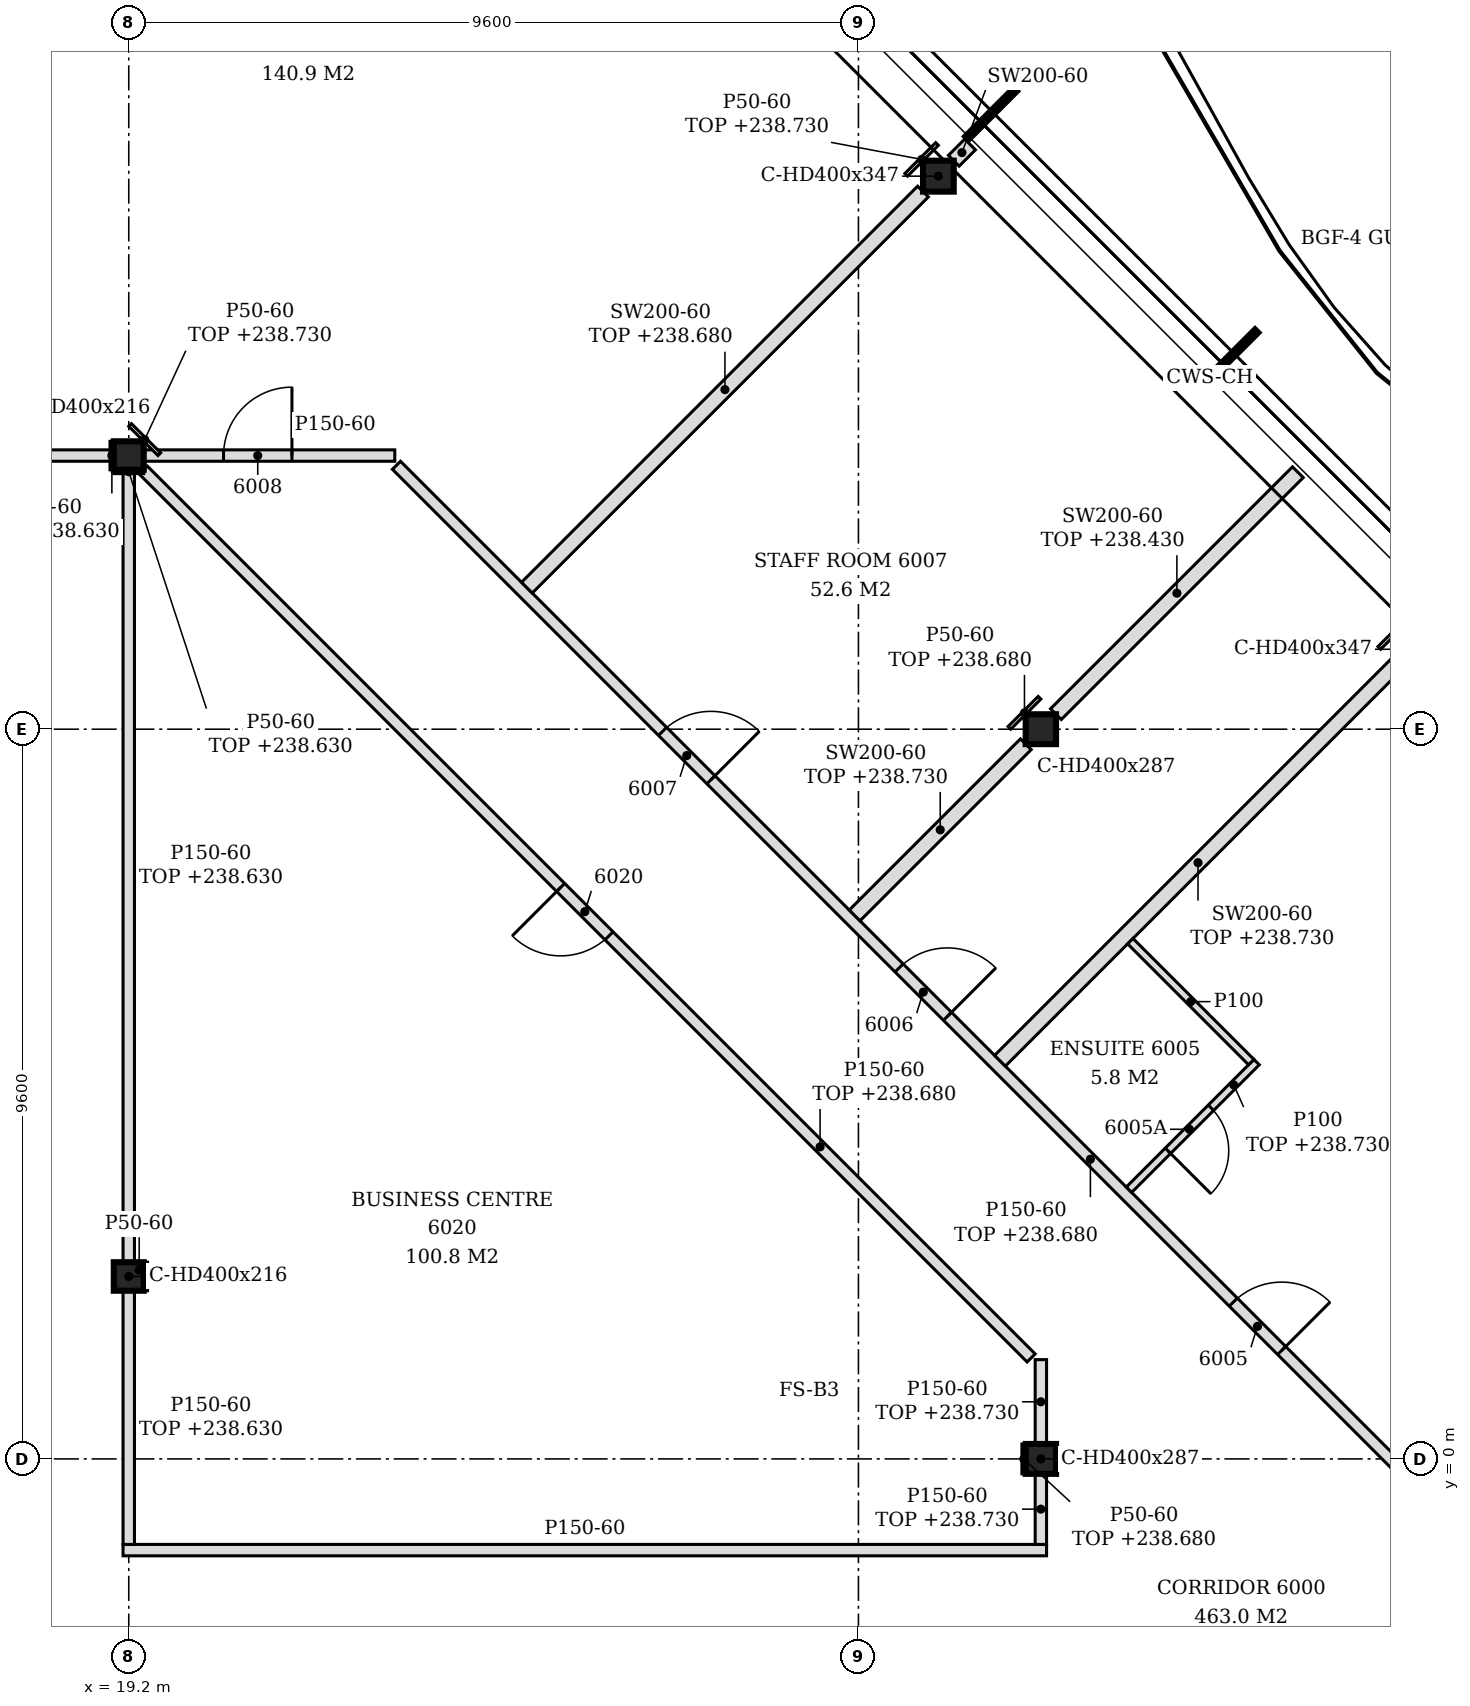
"""IFC4 building model, lengths in metres.
Left out: names, types, materials, properties, quantities, classifications, styles, units other than length and angle.
Written with IfcOpenShell. Run it as: python <this file> out.ifc"""

import sys

from ifc_helpers import new_model, si_unit, direction, frame, frame_2d, origin, origin_2d, place, context, subcontext, project, spatial, polyline, rectangle, i_section, outline, extrude, element, fill, save


model = new_model("IFC4")
c1 = context("Model", 3, precision=1e-05, world=origin(), true_north=direction((0.0, 1.0)))
c2 = subcontext(c1, "Body", "Model", "MODEL_VIEW")
j1 = project(units=[si_unit("LENGTHUNIT", "METRE"), si_unit("PLANEANGLEUNIT", "RADIAN")], contexts=[c1])
p1 = place(None, origin())
s1 = spatial("IfcSite", under=j1, at=p1, CompositionType="ELEMENT")
p2 = place(p1, origin())
s2 = spatial("IfcBuilding", under=s1, at=p2, CompositionType="ELEMENT")
p3 = place(p2, frame((0.0, 0.0, 235.8)))
s3 = spatial("IfcBuildingStorey", under=s2, at=p3, CompositionType="ELEMENT", Elevation=235.8)
p4 = place(p3, frame((29.852, 16.876, -0.15), z_axis=(0.0, 0.0, 1.0), x_axis=(1.0, 0.0, 0.0)))
e1 = element("IfcColumn", 1, at=p4, inside=s3, PredefinedType="COLUMN", context=c2, shape_type="SweptSolid", body=[
    extrude(i_section(OverallWidth=0.404, OverallDepth=0.407, WebThickness=0.027, FlangeThickness=0.044, FilletRadius=0.015, at=origin_2d()), origin(), (0.0, 0.0, 1.0), 3.6),
])
for number, where, z_axis, x_axis in (
    (2, (19.2, 2.4, -0.15), (0.0, 0.0, 1.0), (1.0, 0.0, 0.0)),
    (3, (19.2, 13.2, -0.15), (0.0, 0.0, 1.0), (1.0, 0.0, 0.0)),
):
    element("IfcColumn", number, at=place(p3, frame(where, z_axis=z_axis, x_axis=x_axis)), inside=s3, PredefinedType="COLUMN", context=c2, shape_type="SweptSolid", body=[
        extrude(i_section(OverallWidth=0.394, OverallDepth=0.375, WebThickness=0.017, FlangeThickness=0.028, FilletRadius=0.015, at=origin_2d()), origin(), (0.0, 0.0, 1.0), 3.6),
    ])
for number, where, z_axis, x_axis in (
    (4, (31.2, 0.0, -0.15), (0.0, 0.0, 1.0), (1.0, 0.0, 0.0)),
    (5, (31.2, 9.6, -0.15), (0.0, 0.0, 1.0), (1.0, 0.0, 0.0)),
):
    element("IfcColumn", number, at=place(p3, frame(where, z_axis=z_axis, x_axis=x_axis)), inside=s3, PredefinedType="COLUMN", context=c2, shape_type="SweptSolid", body=[
        extrude(i_section(OverallWidth=0.399, OverallDepth=0.393, WebThickness=0.023, FlangeThickness=0.037, FilletRadius=0.015, at=origin_2d()), origin(), (0.0, 0.0, 1.0), 3.6),
    ])
p5 = place(p3, frame((35.503, -4.012, 0.0), z_axis=(0.0, 0.0, 1.0), x_axis=(0.707106781187, 0.707106781187, 0.0)))
e6 = element("IfcWall", 6, at=p5, inside=s3, PredefinedType="PARTITIONING", context=c2, shape_type="SweptSolid", body=[
    extrude(rectangle(XDim=2.506, YDim=0.15, at=frame_2d((1.253, 0.0))), origin(), (0.0, 0.0, 1.0), 3.45),
])
p6 = place(p3, frame((37.072, -1.278, 0.0), z_axis=(0.0, 0.0, 1.0), x_axis=(-0.707106781187, 0.707106781187, 0.0)))
e7 = element("IfcWall", 7, at=p6, inside=s3, PredefinedType="PARTITIONING", context=c2, shape_type="SweptSolid", body=[
    extrude(rectangle(XDim=20.294, YDim=0.15, at=frame_2d((10.147, 0.0))), origin(), (0.0, 0.0, 1.0), 2.88),
])
p7 = place(p6, frame((3.824, 0.0, 0.0)))
e8 = element("IfcOpeningElement", 8, at=p7, cuts=e7, PredefinedType="OPENING", context=c2, shape_type="SweptSolid", body=[
    extrude(rectangle(XDim=0.9, YDim=2.1, at=frame_2d((0.45, 1.05))), frame((0.0, 0.085, 0.0), z_axis=(0.0, -1.0, 0.0), x_axis=(1.0, 0.0, 0.0)), (0.0, 0.0, 1.0), 0.17),
])
p8 = place(p6, frame((10.042, 0.0, 0.0)))
e9 = element("IfcOpeningElement", 9, at=p8, cuts=e7, PredefinedType="OPENING", context=c2, shape_type="SweptSolid", body=[
    extrude(rectangle(XDim=0.9, YDim=2.1, at=frame_2d((0.45, 1.05))), frame((0.0, 0.085, 0.0), z_axis=(0.0, -1.0, 0.0), x_axis=(1.0, 0.0, 0.0)), (0.0, 0.0, 1.0), 0.17),
])
p9 = place(p6, frame((14.443, 0.0, 0.0)))
e10 = element("IfcOpeningElement", 10, at=p9, cuts=e7, PredefinedType="OPENING", context=c2, shape_type="SweptSolid", body=[
    extrude(rectangle(XDim=0.9, YDim=2.1, at=frame_2d((0.45, 1.05))), frame((0.0, 0.085, 0.0), z_axis=(0.0, -1.0, 0.0), x_axis=(1.0, 0.0, 0.0)), (0.0, 0.0, 1.0), 0.17),
])
p10 = place(p3, frame((19.125, -1.2, 0.0), z_axis=(0.0, 0.0, 1.0), x_axis=(1.0, 0.0, 0.0)))
e11 = element("IfcWall", 11, at=p10, inside=s3, PredefinedType="PARTITIONING", context=c2, shape_type="SweptSolid", body=[
    extrude(outline(polyline([(0.0, 0.0), (12.15, 0.0), (12.15, 2.93), (11.925, 2.93), (11.923, 3.45), (0.225, 3.45), (0.223, 2.83), (0.0, 2.83), (0.0, 0.0)])), frame((0.0, 0.075, 0.0), z_axis=(0.0, -1.0, 0.0), x_axis=(1.0, 0.0, 0.0)), (0.0, 0.0, 1.0), 0.15),
])
p11 = place(p3, frame((19.2, -1.125, 0.0), z_axis=(0.0, 0.0, 1.0), x_axis=(0.0, 1.0, 0.0)))
e12 = element("IfcWall", 12, at=p11, inside=s3, PredefinedType="PARTITIONING", context=c2, shape_type="SweptSolid", body=[
    extrude(rectangle(XDim=3.337, YDim=0.15, at=frame_2d((1.669, 0.0))), origin(), (0.0, 0.0, 1.0), 2.83),
])
p12 = place(p3, frame((31.2, -1.125, 0.0), z_axis=(0.0, 0.0, 1.0), x_axis=(0.0, 1.0, 0.0)))
e13 = element("IfcWall", 13, at=p12, inside=s3, PredefinedType="PARTITIONING", context=c2, shape_type="SweptSolid", body=[
    extrude(rectangle(XDim=0.928, YDim=0.15, at=frame_2d((0.464, 0.0))), origin(), (0.0, 0.0, 1.0), 2.93),
])
p13 = place(p3, frame((31.2, 0.197, 0.0), z_axis=(0.0, 0.0, 1.0), x_axis=(0.0, 1.0, 0.0)))
e14 = element("IfcWall", 14, at=p13, inside=s3, PredefinedType="PARTITIONING", context=c2, shape_type="SweptSolid", body=[
    extrude(rectangle(XDim=1.11, YDim=0.15, at=frame_2d((0.555, 0.0))), origin(), (0.0, 0.0, 1.0), 2.93),
])
p14 = place(p3, frame((31.072, 1.328, 0.0), z_axis=(0.0, 0.0, 1.0), x_axis=(-0.707099390895, 0.707114171401, 0.0)))
e15 = element("IfcWall", 15, at=p14, inside=s3, PredefinedType="PARTITIONING", context=c2, shape_type="SweptSolid", body=[
    extrude(rectangle(XDim=16.518, YDim=0.15, at=frame_2d((8.259, 0.0))), origin(), (0.0, 0.0, 1.0), 2.88),
])
p15 = place(p14, frame((7.854, 0.0, 0.0)))
e16 = element("IfcOpeningElement", 16, at=p15, cuts=e15, PredefinedType="OPENING", context=c2, shape_type="SweptSolid", body=[
    extrude(rectangle(XDim=0.9, YDim=2.1, at=frame_2d((0.45, 1.05))), frame((0.0, 0.085, 0.0), z_axis=(0.0, -1.0, 0.0), x_axis=(1.0, 0.0, 0.0)), (0.0, 0.0, 1.0), 0.17),
])
p16 = place(p3, frame((19.2, 2.587, 0.0), z_axis=(0.0, 0.0, 1.0), x_axis=(0.0, 1.0, 0.0)))
e17 = element("IfcWall", 17, at=p16, inside=s3, PredefinedType="PARTITIONING", context=c2, shape_type="SweptSolid", body=[
    extrude(rectangle(XDim=10.425, YDim=0.15, at=frame_2d((5.212, 0.0))), origin(), (0.0, 0.0, 1.0), 2.83),
])
p17 = place(p3, frame((32.359, 3.541, 0.0), z_axis=(0.0, 0.0, 1.0), x_axis=(0.707158179099, 0.707055379538, 0.0)))
e18 = element("IfcWall", 18, at=p17, inside=s3, PredefinedType="PARTITIONING", context=c2, shape_type="SweptSolid", body=[
    extrude(rectangle(XDim=2.375, YDim=0.1, at=frame_2d((1.188, 0.0))), origin(), (0.0, 0.0, 1.0), 2.93),
])
p18 = place(p17, frame((0.725, 0.0, 0.0)))
e19 = element("IfcOpeningElement", 19, at=p18, cuts=e18, PredefinedType="OPENING", context=c2, shape_type="SweptSolid", body=[
    extrude(rectangle(XDim=0.8, YDim=2.1, at=frame_2d((0.4, 1.05))), frame((0.0, 0.06, 0.0), z_axis=(0.0, -1.0, 0.0), x_axis=(1.0, 0.0, 0.0)), (0.0, 0.0, 1.0), 0.12),
])
p19 = place(p3, frame((30.662, 5.238, 0.0), z_axis=(0.0, 0.0, 1.0), x_axis=(0.707106781187, 0.707106781187, 0.0)))
e20 = element("IfcWall", 20, at=p19, inside=s3, PredefinedType="PARTITIONING", context=c2, shape_type="SweptSolid", body=[
    extrude(rectangle(XDim=7.369, YDim=0.2, at=frame_2d((3.685, 0.0))), origin(), (0.0, 0.0, 1.0), 2.93),
])
p20 = place(p3, frame((33.968, 5.22, 0.0), z_axis=(0.0, 0.0, 1.0), x_axis=(-0.707106781187, 0.707106781187, 0.0)))
e21 = element("IfcWall", 21, at=p20, inside=s3, PredefinedType="PARTITIONING", context=c2, shape_type="SweptSolid", body=[
    extrude(rectangle(XDim=2.25, YDim=0.1, at=frame_2d((1.125, 0.0))), origin(), (0.0, 0.0, 1.0), 3.45),
])
p21 = place(p3, frame((28.75, 7.15, 0.0), z_axis=(0.0, 0.0, 1.0), x_axis=(0.7070684525, 0.707145107796, 0.0)))
e22 = element("IfcWall", 22, at=p21, inside=s3, PredefinedType="PARTITIONING", context=c2, shape_type="SweptSolid", body=[
    extrude(rectangle(XDim=3.185, YDim=0.2, at=frame_2d((1.592, 0.0))), origin(), (0.0, 0.0, 1.0), 2.93),
])
p22 = place(p3, frame((31.398, 9.798, 0.0), z_axis=(0.0, 0.0, 1.0), x_axis=(0.707133900936, 0.707079660397, 0.0)))
e23 = element("IfcWall", 23, at=p22, inside=s3, PredefinedType="PARTITIONING", context=c2, shape_type="SweptSolid", body=[
    extrude(rectangle(XDim=4.501, YDim=0.2, at=frame_2d((2.25, 0.0))), origin(), (0.0, 0.0, 1.0), 2.63),
])
p23 = place(p3, frame((24.438, 11.462, 0.0), z_axis=(0.0, 0.0, 1.0), x_axis=(0.707090216072, 0.707123345913, 0.0)))
e24 = element("IfcWall", 24, at=p23, inside=s3, PredefinedType="PARTITIONING", context=c2, shape_type="SweptSolid", body=[
    extrude(rectangle(XDim=7.369, YDim=0.2, at=frame_2d((3.685, 0.0))), origin(), (0.0, 0.0, 1.0), 2.88),
])
p24 = place(p3, frame((7.397, 13.2, 0.0), z_axis=(0.0, 0.0, 1.0), x_axis=(1.0, 0.0, 0.0)))
e25 = element("IfcWall", 25, at=p24, inside=s3, PredefinedType="PARTITIONING", context=c2, shape_type="SweptSolid", body=[
    extrude(rectangle(XDim=11.606, YDim=0.15, at=frame_2d((5.803, 0.0))), origin(), (0.0, 0.0, 1.0), 2.83),
])
p25 = place(p24, frame((3.227, 0.0, 0.0)))
e26 = element("IfcOpeningElement", 26, at=p25, cuts=e25, PredefinedType="OPENING", context=c2, shape_type="SweptSolid", body=[
    extrude(rectangle(XDim=1.8, YDim=2.1, at=frame_2d((0.9, 1.05))), frame((0.0, 0.085, 0.0), z_axis=(0.0, -1.0, 0.0), x_axis=(1.0, 0.0, 0.0)), (0.0, 0.0, 1.0), 0.17),
])
p26 = place(p3, frame((19.397, 13.2, 0.0), z_axis=(0.0, 0.0, 1.0), x_axis=(1.0, 0.0, 0.0)))
e27 = element("IfcWall", 27, at=p26, inside=s3, PredefinedType="PARTITIONING", context=c2, shape_type="SweptSolid", body=[
    extrude(rectangle(XDim=3.303, YDim=0.15, at=frame_2d((1.652, 0.0))), origin(), (0.0, 0.0, 1.0), 3.45),
])
p27 = place(p26, frame((1.05, 0.0, 0.0)))
e28 = element("IfcOpeningElement", 28, at=p27, cuts=e27, PredefinedType="OPENING", context=c2, shape_type="SweptSolid", body=[
    extrude(rectangle(XDim=0.9, YDim=2.1, at=frame_2d((0.45, 1.05))), frame((0.0, 0.085, 0.0), z_axis=(0.0, -1.0, 0.0), x_axis=(1.0, 0.0, 0.0)), (0.0, 0.0, 1.0), 0.17),
])
p28 = place(p3, frame((30.054, 17.078, 0.0), z_axis=(0.0, 0.0, 1.0), x_axis=(0.707106781187, 0.707106781187, 0.0)))
e29 = element("IfcWall", 29, at=p28, inside=s3, PredefinedType="PARTITIONING", context=c2, shape_type="SweptSolid", body=[
    extrude(rectangle(XDim=0.303, YDim=0.2, at=frame_2d((0.152, 0.0))), origin(), (0.0, 0.0, 1.0), 3.45),
])
p29 = place(p3, frame((19.422, 2.212, 0.0), z_axis=(0.0, 0.0, 1.0), x_axis=(0.0, 1.0, 0.0)))
e30 = element("IfcWall", 30, at=p29, inside=s3, PredefinedType="PARTITIONING", context=c2, shape_type="SweptSolid", body=[
    extrude(rectangle(XDim=0.375, YDim=0.05, at=frame_2d((0.188, 0.0))), origin(), (0.0, 0.0, 1.0), 3.45),
])
p30 = place(p3, frame((18.978, 13.012, 0.0), z_axis=(0.0, 0.0, 1.0), x_axis=(0.0, 1.0, 0.0)))
e31 = element("IfcWall", 31, at=p30, inside=s3, PredefinedType="PARTITIONING", context=c2, shape_type="SweptSolid", body=[
    extrude(rectangle(XDim=0.375, YDim=0.05, at=frame_2d((0.188, 0.0))), origin(), (0.0, 0.0, 1.0), 2.83),
])
p31 = place(p3, frame((30.976, -0.197, 0.0), z_axis=(0.0, 0.0, 1.0), x_axis=(0.0, 1.0, 0.0)))
e32 = element("IfcWall", 32, at=p31, inside=s3, PredefinedType="PARTITIONING", context=c2, shape_type="SweptSolid", body=[
    extrude(rectangle(XDim=0.393, YDim=0.05, at=frame_2d((0.197, 0.0))), origin(), (0.0, 0.0, 1.0), 2.88),
])
p32 = place(p3, frame((19.602, 13.218, 0.0), z_axis=(0.0, 0.0, 1.0), x_axis=(-0.707106781187, 0.707106781187, 0.0)))
e33 = element("IfcWall", 33, at=p32, inside=s3, PredefinedType="PARTITIONING", context=c2, shape_type="SweptSolid", body=[
    extrude(rectangle(XDim=0.544, YDim=0.05, at=frame_2d((0.272, 0.0))), origin(), (0.0, 0.0, 1.0), 2.93),
])
p33 = place(p3, frame((35.653, 10.669, 0.0), z_axis=(0.0, 0.0, 1.0), x_axis=(0.707106781187, 0.707106781187, 0.0)))
e34 = element("IfcWall", 34, at=p33, inside=s3, PredefinedType="PARTITIONING", context=c2, shape_type="SweptSolid", body=[
    extrude(rectangle(XDim=0.573, YDim=0.05, at=frame_2d((0.287, 0.0))), origin(), (0.0, 0.0, 1.0), 2.63),
])
p34 = place(p3, frame((30.786, 9.618, 0.0), z_axis=(0.0, 0.0, 1.0), x_axis=(0.707106781187, 0.707106781187, 0.0)))
e35 = element("IfcWall", 35, at=p34, inside=s3, PredefinedType="PARTITIONING", context=c2, shape_type="SweptSolid", body=[
    extrude(rectangle(XDim=0.56, YDim=0.05, at=frame_2d((0.28, 0.0))), origin(), (0.0, 0.0, 1.0), 2.88),
])
p35 = place(p3, frame((29.428, 16.893, 0.0), z_axis=(0.0, 0.0, 1.0), x_axis=(0.707106781187, 0.707106781187, 0.0)))
e36 = element("IfcWall", 36, at=p35, inside=s3, PredefinedType="PARTITIONING", context=c2, shape_type="SweptSolid", body=[
    extrude(rectangle(XDim=0.573, YDim=0.05, at=frame_2d((0.287, 0.0))), origin(), (0.0, 0.0, 1.0), 2.93),
])
p36 = place(p3, frame((19.003, 12.988, 0.0), z_axis=(0.0, 0.0, 1.0), x_axis=(1.0, 0.0, 0.0)))
e37 = element("IfcWall", 37, at=p36, inside=s3, PredefinedType="PARTITIONING", context=c2, shape_type="SweptSolid", body=[
    extrude(rectangle(XDim=0.394, YDim=0.05, at=frame_2d((0.197, 0.0))), origin(), (0.0, 0.0, 1.0), 2.83),
])
p37 = place(p7, frame((0.9, 0.0, 0.0), z_axis=(0.0, 0.0, 1.0), x_axis=(-1.0, 0.0, 0.0)))
e38 = element("IfcDoor", 38, at=p37, inside=s3, OperationType="SINGLE_SWING_RIGHT", PredefinedType="DOOR", context=c2, shape_type="SweptSolid", body=[
    extrude(rectangle(XDim=0.9, YDim=2.1, at=frame_2d((0.45, 1.05))), frame((0.0, 0.025, 0.0), z_axis=(0.0, -1.0, 0.0), x_axis=(1.0, 0.0, 0.0)), (0.0, 0.0, 1.0), 0.05),
])
fill(e8, e38)
p38 = place(p18, frame((0.8, 0.0, 0.0), z_axis=(0.0, 0.0, 1.0), x_axis=(-1.0, 0.0, 0.0)))
e39 = element("IfcDoor", 39, at=p38, inside=s3, OperationType="SINGLE_SWING_RIGHT", PredefinedType="DOOR", context=c2, shape_type="SweptSolid", body=[
    extrude(rectangle(XDim=0.8, YDim=2.1, at=frame_2d((0.4, 1.05))), frame((0.0, 0.025, 0.0), z_axis=(0.0, -1.0, 0.0), x_axis=(1.0, 0.0, 0.0)), (0.0, 0.0, 1.0), 0.05),
])
fill(e19, e39)
p39 = place(p8, frame((0.9, 0.0, 0.0), z_axis=(0.0, 0.0, 1.0), x_axis=(-1.0, 0.0, 0.0)))
e40 = element("IfcDoor", 40, at=p39, inside=s3, OperationType="SINGLE_SWING_RIGHT", PredefinedType="DOOR", context=c2, shape_type="SweptSolid", body=[
    extrude(rectangle(XDim=0.9, YDim=2.1, at=frame_2d((0.45, 1.05))), frame((0.0, 0.025, 0.0), z_axis=(0.0, -1.0, 0.0), x_axis=(1.0, 0.0, 0.0)), (0.0, 0.0, 1.0), 0.05),
])
fill(e9, e40)
p40 = place(p9, frame((0.9, 0.0, 0.0), z_axis=(0.0, 0.0, 1.0), x_axis=(-1.0, 0.0, 0.0)))
e41 = element("IfcDoor", 41, at=p40, inside=s3, OperationType="SINGLE_SWING_RIGHT", PredefinedType="DOOR", context=c2, shape_type="SweptSolid", body=[
    extrude(rectangle(XDim=0.9, YDim=2.1, at=frame_2d((0.45, 1.05))), frame((0.0, 0.025, 0.0), z_axis=(0.0, -1.0, 0.0), x_axis=(1.0, 0.0, 0.0)), (0.0, 0.0, 1.0), 0.05),
])
fill(e10, e41)
p41 = place(p27, origin())
e42 = element("IfcDoor", 42, at=p41, inside=s3, OperationType="SINGLE_SWING_RIGHT", PredefinedType="DOOR", context=c2, shape_type="SweptSolid", body=[
    extrude(rectangle(XDim=0.9, YDim=2.1, at=frame_2d((0.45, 1.05))), frame((0.0, 0.025, 0.0), z_axis=(0.0, -1.0, 0.0), x_axis=(1.0, 0.0, 0.0)), (0.0, 0.0, 1.0), 0.05),
])
fill(e28, e42)
p42 = place(p15, origin())
e43 = element("IfcDoor", 43, at=p42, inside=s3, OperationType="SINGLE_SWING_RIGHT", PredefinedType="DOOR", context=c2, shape_type="SweptSolid", body=[
    extrude(rectangle(XDim=0.9, YDim=2.1, at=frame_2d((0.45, 1.05))), frame((0.0, 0.025, 0.0), z_axis=(0.0, -1.0, 0.0), x_axis=(1.0, 0.0, 0.0)), (0.0, 0.0, 1.0), 0.05),
])
fill(e16, e43)
save(model, sys.argv[1])
